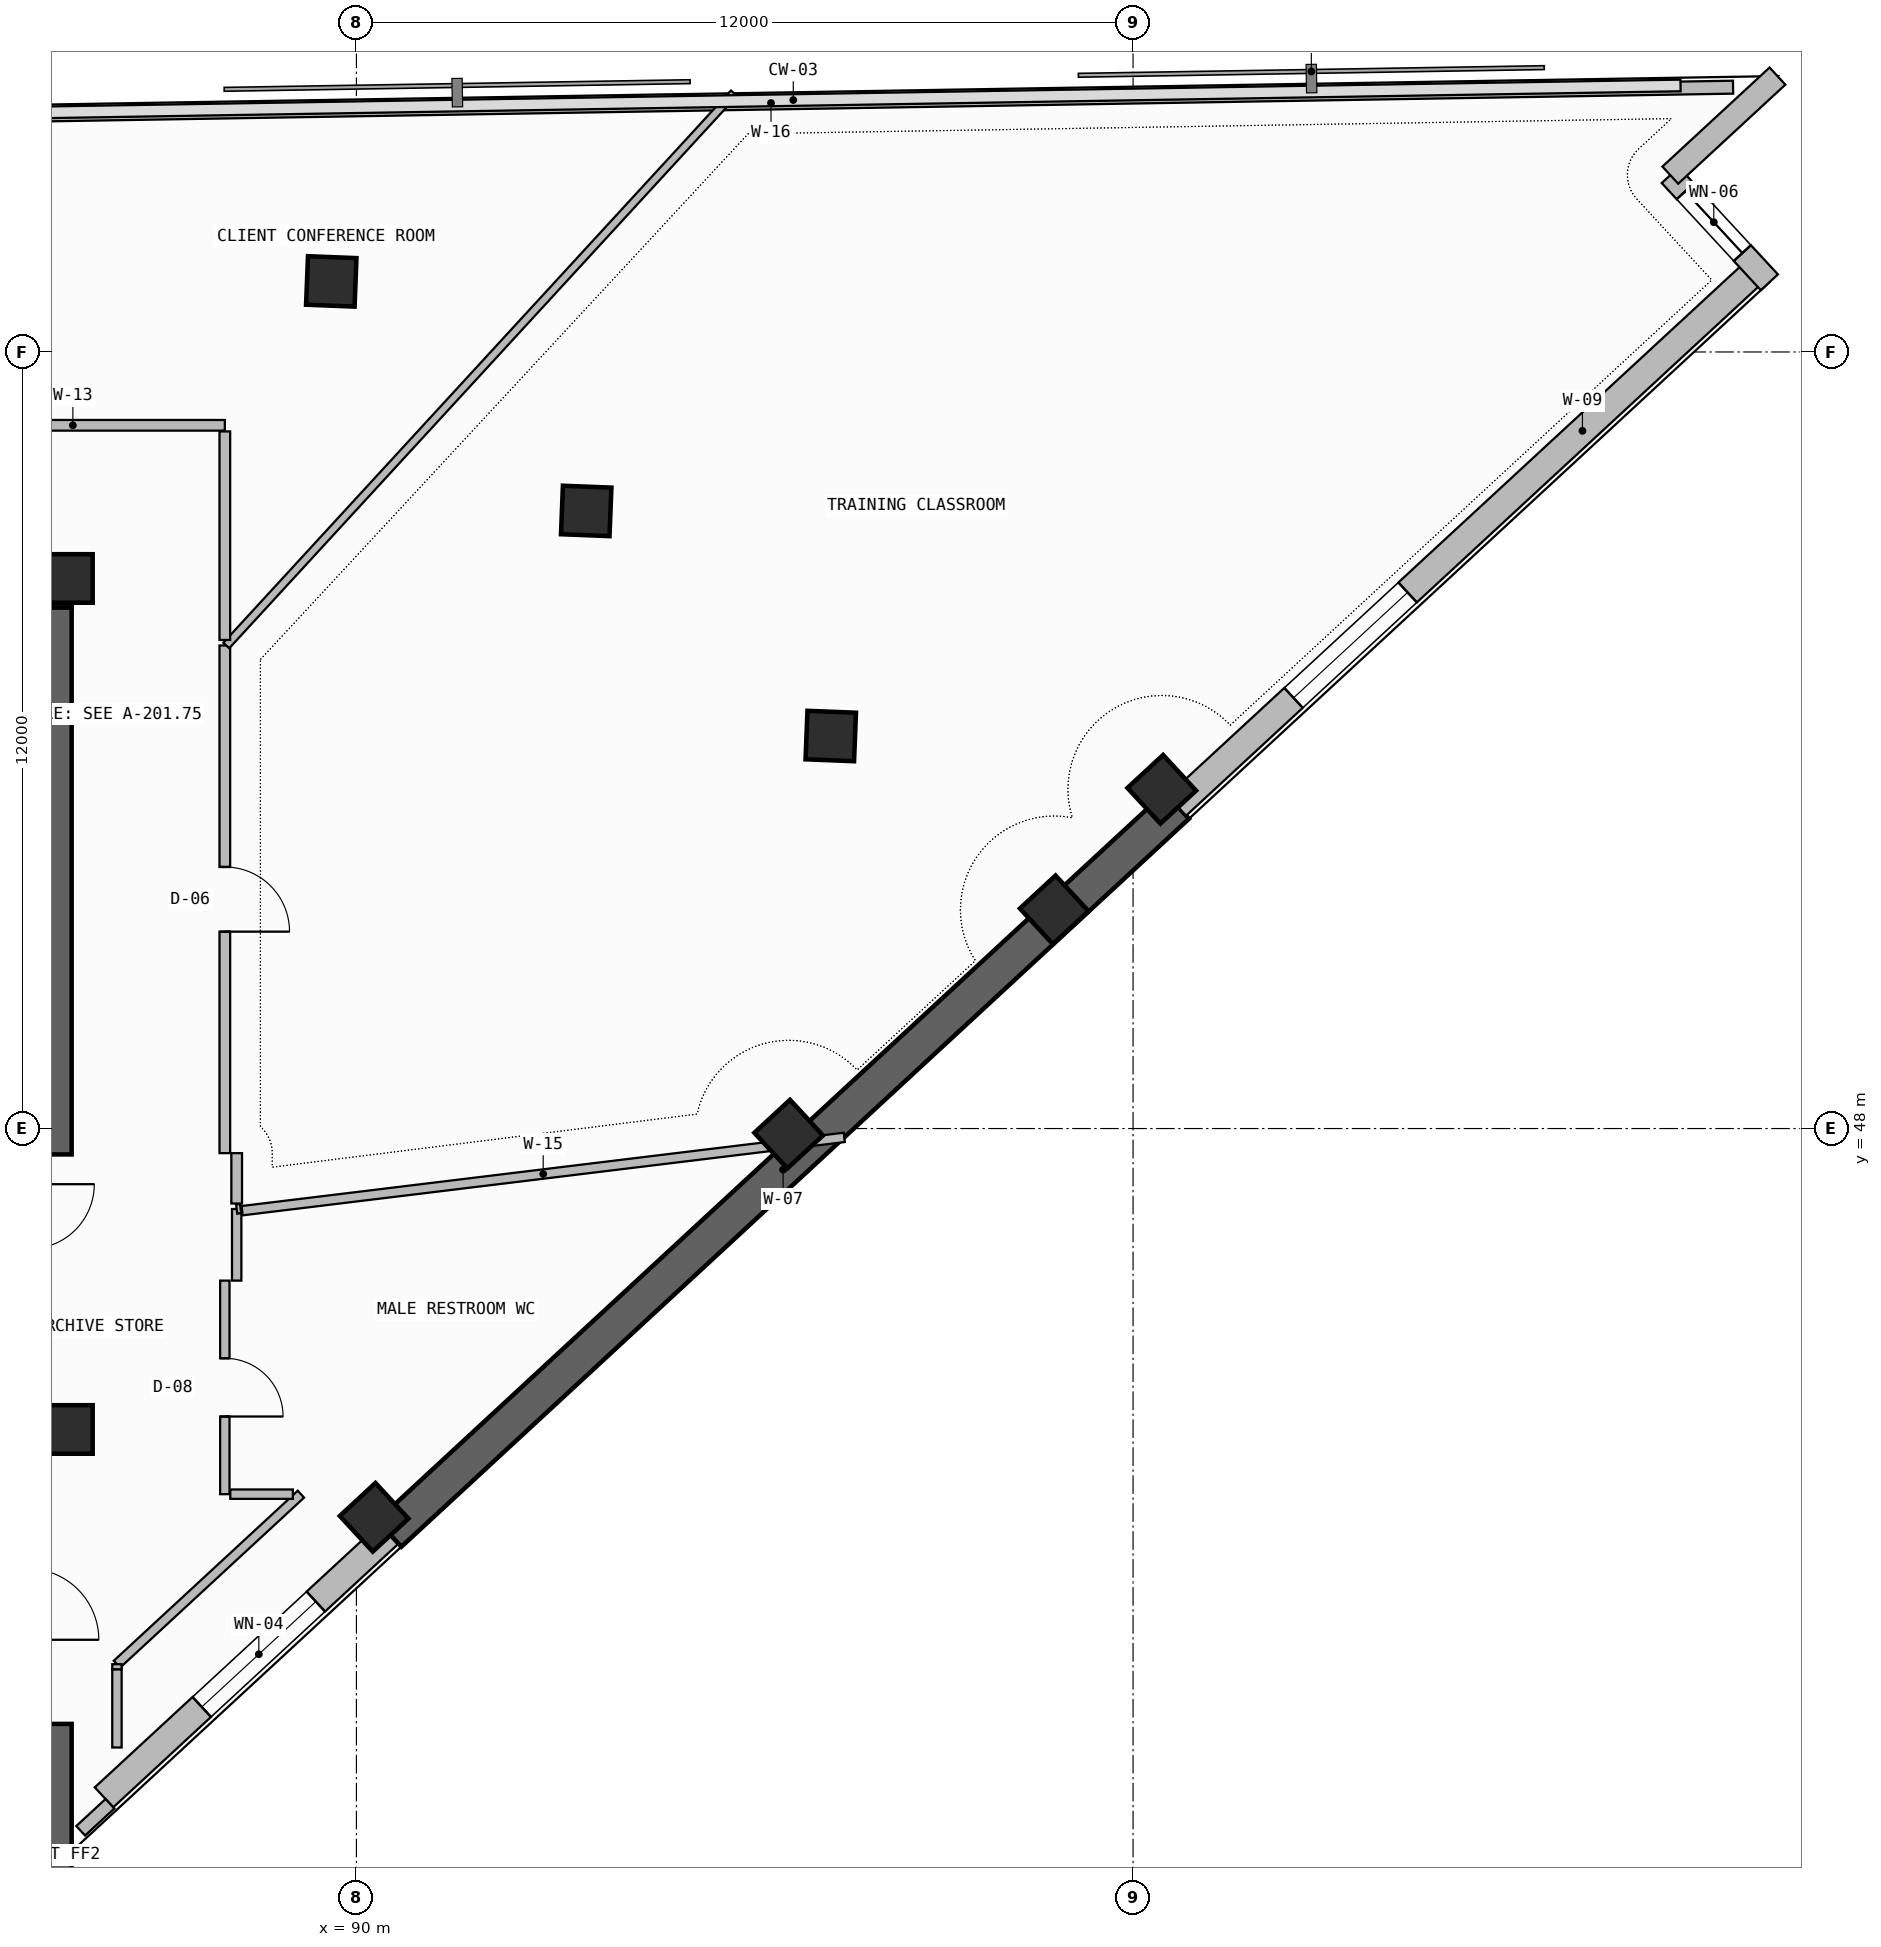
"""IFC4 building model, lengths in metres.
Left out: names, types, materials, properties, quantities, classifications, styles, units other than length and angle.
Written with IfcOpenShell. Run it as: python <this file> out.ifc"""

import sys

from ifc_helpers import new_model, si_unit, direction, frame, frame_2d, origin, origin_2d, place, context, subcontext, project, spatial, rectangle, extrude, element, fill, save


model = new_model("IFC4")
c1 = context("Model", 3, precision=1e-05, world=origin(), true_north=direction((0.0, 1.0)))
c2 = subcontext(c1, "Body", "Model", "MODEL_VIEW")
j1 = project(units=[si_unit("LENGTHUNIT", "METRE"), si_unit("PLANEANGLEUNIT", "RADIAN")], contexts=[c1])
p1 = place(None, origin())
s1 = spatial("IfcSite", under=j1, at=p1, CompositionType="ELEMENT")
p2 = place(p1, origin())
s2 = spatial("IfcBuilding", under=s1, at=p2, CompositionType="ELEMENT")
p3 = place(p2, frame((0.0, 0.0, 267.78)))
s3 = spatial("IfcBuildingStorey", under=s2, at=p3, CompositionType="ELEMENT", Elevation=267.78)
p4 = place(p3, frame((85.3, 35.5, -0.26), z_axis=(0.0, 0.0, 1.0), x_axis=(0.0, 1.0, 0.0)))
e1 = element("IfcWall", 1, at=p4, inside=s3, PredefinedType="SHEAR", context=c2, shape_type="SweptSolid", body=[
    extrude(rectangle(XDim=3.3, YDim=0.6, at=frame_2d((1.65, 0.0))), origin(), (0.0, 0.0, 1.0), 3.52),
])
p5 = place(p3, frame((72.0, 56.35, -0.26), z_axis=(0.0, 0.0, 1.0), x_axis=(1.0, 0.0, 0.0)))
e2 = element("IfcWall", 2, at=p5, inside=s3, PredefinedType="SHEAR", context=c2, shape_type="SweptSolid", body=[
    extrude(rectangle(XDim=13.6, YDim=0.6, at=frame_2d((6.8, 0.0))), origin(), (0.0, 0.0, 1.0), 3.52),
])
p6 = place(p3, frame((85.3, 47.6, -0.26), z_axis=(0.0, 0.0, 1.0), x_axis=(0.0, 1.0, 0.0)))
e3 = element("IfcWall", 3, at=p6, inside=s3, PredefinedType="SHEAR", context=c2, shape_type="SweptSolid", body=[
    extrude(rectangle(XDim=8.45, YDim=0.6, at=frame_2d((4.225, 0.0))), origin(), (0.0, 0.0, 1.0), 3.52),
])
for number, where, z_axis, x_axis in (
    (4, (85.55, 43.35, 0.0), (0.0, 0.0, 1.0), (1.0, 0.0, 0.0)),
    (5, (85.55, 56.5, 0.0), (0.0, 0.0, 1.0), (1.0, 0.0, 0.0)),
    (6, (90.273, 41.993, 0.0), (0.0, 0.0, 1.0), (0.734, 0.679, 0.0)),
    (7, (96.679, 47.914, 0.0), (0.0, 0.0, 1.0), (0.734, 0.679, 0.0)),
    (8, (102.443, 53.242, 0.0), (0.0, 0.0, 1.0), (0.734, 0.679, 0.0)),
    (9, (100.782, 51.38, 0.0), (0.0, 0.0, 1.0), (0.734, 0.679, 0.0)),
    (10, (97.329, 54.065, 0.0), (0.0, 0.0, 1.0), (0.039, 0.999, 0.0)),
    (11, (93.55, 57.544, 0.0), (0.0, 0.0, 1.0), (0.039, 0.999, 0.0)),
    (12, (89.611, 61.09, 0.0), (0.0, 0.0, 1.0), (0.039, 0.999, 0.0)),
):
    element("IfcColumn", number, at=place(p3, frame(where, z_axis=z_axis, x_axis=x_axis)), inside=s3, PredefinedType="COLUMN", context=c2, shape_type="SweptSolid", body=[
        extrude(rectangle(XDim=0.75, YDim=0.75, at=origin_2d()), origin(), (0.0, 0.0, 1.0), 3.52),
    ])
p7 = place(p3, frame((86.1, 37.665, 0.0), z_axis=(0.0, 0.0, 1.0), x_axis=(0.734321413343, 0.678801931277, 0.0)))
e13 = element("IfcWall", 13, at=p7, inside=s3, PredefinedType="SOLIDWALL", context=c2, shape_type="SweptSolid", body=[
    extrude(rectangle(XDim=6.002, YDim=0.42, at=frame_2d((3.001, 0.0))), origin(), (0.0, 0.0, 1.0), 2.245),
])
p8 = place(p7, frame((2.057, 0.0, 0.965)))
e14 = element("IfcOpeningElement", 14, at=p8, cuts=e13, PredefinedType="OPENING", context=c2, shape_type="SweptSolid", body=[
    extrude(rectangle(XDim=2.4, YDim=1.2, at=frame_2d((1.2, 0.6))), frame((0.0, 0.22, 0.0), z_axis=(0.0, -1.0, 0.0), x_axis=(1.0, 0.0, 0.0)), (0.0, 0.0, 1.0), 0.44),
])
p9 = place(p3, frame((90.508, 41.74, -0.26), z_axis=(0.0, 0.0, 1.0), x_axis=(0.734315848115, 0.678807951638, 0.0)))
e15 = element("IfcWall", 15, at=p9, inside=s3, PredefinedType="SHEAR", context=c2, shape_type="SweptSolid", body=[
    extrude(rectangle(XDim=16.573, YDim=0.55, at=frame_2d((8.286, 0.0))), origin(), (0.0, 0.0, 1.0), 3.52),
])
p10 = place(p3, frame((102.677, 52.989, 0.0), z_axis=(0.0, 0.0, 1.0), x_axis=(0.734331107219, 0.678791444386, 0.0)))
e16 = element("IfcWall", 16, at=p10, inside=s3, PredefinedType="SOLIDWALL", context=c2, shape_type="SweptSolid", body=[
    extrude(rectangle(XDim=12.211, YDim=0.42, at=frame_2d((6.106, 0.0))), origin(), (0.0, 0.0, 1.0), 2.245),
])
p11 = place(p10, frame((2.454, 0.0, 0.965)))
e17 = element("IfcOpeningElement", 17, at=p11, cuts=e16, PredefinedType="OPENING", context=c2, shape_type="SweptSolid", body=[
    extrude(rectangle(XDim=2.4, YDim=1.2, at=frame_2d((1.2, 0.6))), frame((0.0, 0.22, 0.0), z_axis=(0.0, -1.0, 0.0), x_axis=(1.0, 0.0, 0.0)), (0.0, 0.0, 1.0), 0.44),
])
p12 = place(p3, frame((111.832, 61.076, 0.0), z_axis=(0.0, 0.0, 1.0), x_axis=(-0.678792531533, 0.734330102294, 0.0)))
e18 = element("IfcWall", 18, at=p12, inside=s3, PredefinedType="SOLIDWALL", context=c2, shape_type="SweptSolid", body=[
    extrude(rectangle(XDim=2.255, YDim=0.36, at=frame_2d((1.127, 0.0))), origin(), (0.0, 0.0, 1.0), 3.26),
])
p13 = place(p12, frame((0.615, 0.0, 0.45)))
e19 = element("IfcOpeningElement", 19, at=p13, cuts=e18, PredefinedType="OPENING", context=c2, shape_type="SweptSolid", body=[
    extrude(rectangle(XDim=1.3, YDim=2.4, at=frame_2d((0.65, 1.2))), frame((0.0, 0.19, 0.0), z_axis=(0.0, -1.0, 0.0), x_axis=(1.0, 0.0, 0.0)), (0.0, 0.0, 1.0), 0.38),
])
p14 = place(p3, frame((110.301, 62.732, 0.0), z_axis=(0.0, 0.0, 1.0), x_axis=(0.734330102294, 0.678792531533, 0.0)))
e20 = element("IfcWall", 20, at=p14, inside=s3, PredefinedType="SOLIDWALL", context=c2, shape_type="SweptSolid", body=[
    extrude(rectangle(XDim=2.255, YDim=0.36, at=frame_2d((1.127, 0.0))), origin(), (0.0, 0.0, 1.0), 3.26),
])
p15 = place(p3, frame((111.271, 64.092, 0.0), z_axis=(0.0, 0.0, 1.0), x_axis=(-0.999864741935, -0.016446818413, 0.0)))
e21 = element("IfcWall", 21, at=p15, inside=s3, PredefinedType="PARAPET", context=c2, shape_type="SweptSolid", body=[
    extrude(rectangle(XDim=29.733, YDim=0.2, at=frame_2d((14.866, 0.0))), origin(), (0.0, 0.0, 1.0), 1.15),
])
p16 = place(p3, frame((86.192, 37.566, 0.0), z_axis=(0.0, 0.0, 1.0), x_axis=(-0.734346728958, -0.678774544064, 0.0)))
e22 = element("IfcWall", 22, at=p16, inside=s3, PredefinedType="PARAPET", context=c2, shape_type="SweptSolid", body=[
    extrude(rectangle(XDim=0.615, YDim=0.2, at=frame_2d((0.308, 0.0))), origin(), (0.0, 0.0, 1.0), 1.15),
])
p17 = place(p3, frame((86.3, 39.722, 0.0), z_axis=(0.0, 0.0, 1.0), x_axis=(0.734312402088, 0.678811679436, 0.0)))
e23 = element("IfcWall", 23, at=p17, inside=s3, PredefinedType="PARTITIONING", context=c2, shape_type="SweptSolid", body=[
    extrude(rectangle(XDim=3.871, YDim=0.145, at=frame_2d((1.936, 0.0))), origin(), (0.0, 0.0, 1.0), 2.745),
])
p18 = place(p3, frame((87.967, 42.35, 0.0), z_axis=(0.0, 0.0, 1.0), x_axis=(0.0, 1.0, 0.0)))
e24 = element("IfcWall", 24, at=p18, inside=s3, PredefinedType="PARTITIONING", context=c2, shape_type="SweptSolid", body=[
    extrude(rectangle(XDim=3.3, YDim=0.145, at=frame_2d((1.65, 0.0))), origin(), (0.0, 0.0, 1.0), 2.745),
])
p19 = place(p18, frame((1.2, 0.0, 0.0)))
e25 = element("IfcOpeningElement", 25, at=p19, cuts=e24, PredefinedType="OPENING", context=c2, shape_type="SweptSolid", body=[
    extrude(rectangle(XDim=0.9, YDim=2.1, at=frame_2d((0.45, 1.05))), frame((0.0, 0.083, 0.0), z_axis=(0.0, -1.0, 0.0), x_axis=(1.0, 0.0, 0.0)), (0.0, 0.0, 1.0), 0.165),
])
p20 = place(p3, frame((89.018, 42.35, 0.0), z_axis=(0.0, 0.0, 1.0), x_axis=(-1.0, 0.0, 0.0)))
e26 = element("IfcWall", 26, at=p20, inside=s3, PredefinedType="PARTITIONING", context=c2, shape_type="SweptSolid", body=[
    extrude(rectangle(XDim=0.967, YDim=0.145, at=frame_2d((0.483, 0.0))), origin(), (0.0, 0.0, 1.0), 2.745),
])
p21 = place(p3, frame((88.15, 45.65, 0.0), z_axis=(0.0, 0.0, 1.0), x_axis=(0.0, 1.0, 0.0)))
e27 = element("IfcWall", 27, at=p21, inside=s3, PredefinedType="PARTITIONING", context=c2, shape_type="SweptSolid", body=[
    extrude(rectangle(XDim=1.106, YDim=0.145, at=frame_2d((0.553, 0.0))), origin(), (0.0, 0.0, 1.0), 3.26),
])
p22 = place(p3, frame((86.3, 39.641, 0.0), z_axis=(0.0, 0.0, 1.0), x_axis=(0.0, 1.0, 0.0)))
e28 = element("IfcWall", 28, at=p22, inside=s3, PredefinedType="PARTITIONING", context=c2, shape_type="SweptSolid", body=[
    extrude(rectangle(XDim=0.082, YDim=0.145, at=frame_2d((0.041, 0.0))), origin(), (0.0, 0.0, 1.0), 3.26),
])
p23 = place(p3, frame((88.15, 46.756, 0.0), z_axis=(0.0, 0.0, 1.0), x_axis=(0.992153283358, 0.125027446277, 0.0)))
e29 = element("IfcWall", 29, at=p23, inside=s3, PredefinedType="PARTITIONING", context=c2, shape_type="SweptSolid", body=[
    extrude(rectangle(XDim=0.061, YDim=0.145, at=frame_2d((0.03, 0.0))), origin(), (0.0, 0.0, 1.0), 3.26),
])
p24 = place(p3, frame((88.235, 46.731, 0.0), z_axis=(0.0, 0.0, 1.0), x_axis=(0.992670746965, 0.120850271491, 0.0)))
e30 = element("IfcWall", 30, at=p24, inside=s3, PredefinedType="PARTITIONING", context=c2, shape_type="SweptSolid", body=[
    extrude(rectangle(XDim=9.372, YDim=0.145, at=frame_2d((4.686, 0.0))), origin(), (0.0, 0.0, 1.0), 2.245),
])
p25 = place(p3, frame((87.967, 47.62, 0.0), z_axis=(0.0, 0.0, 1.0), x_axis=(0.0, 1.0, 0.0)))
e31 = element("IfcWall", 31, at=p25, inside=s3, PredefinedType="PARTITIONING", context=c2, shape_type="SweptSolid", body=[
    extrude(rectangle(XDim=7.844, YDim=0.165, at=frame_2d((3.922, 0.0))), origin(), (0.0, 0.0, 1.0), 3.26),
])
p26 = place(p25, frame((3.422, 0.0, 0.0)))
e32 = element("IfcOpeningElement", 32, at=p26, cuts=e31, PredefinedType="OPENING", context=c2, shape_type="SweptSolid", body=[
    extrude(rectangle(XDim=1.0, YDim=2.2, at=frame_2d((0.5, 1.1))), frame((0.0, 0.093, 0.0), z_axis=(0.0, -1.0, 0.0), x_axis=(1.0, 0.0, 0.0)), (0.0, 0.0, 1.0), 0.185),
])
p27 = place(p3, frame((88.15, 46.841, 0.0), z_axis=(0.0, 0.0, 1.0), x_axis=(0.0, 1.0, 0.0)))
e33 = element("IfcWall", 33, at=p27, inside=s3, PredefinedType="PARTITIONING", context=c2, shape_type="SweptSolid", body=[
    extrude(rectangle(XDim=0.779, YDim=0.165, at=frame_2d((0.389, 0.0))), origin(), (0.0, 0.0, 1.0), 3.26),
])
p28 = place(p3, frame((87.99, 55.464, 0.0), z_axis=(0.0, 0.0, 1.0), x_axis=(0.676751206436, 0.736211793295, 0.0)))
e34 = element("IfcWall", 34, at=p28, inside=s3, PredefinedType="PARTITIONING", context=c2, shape_type="SweptSolid", body=[
    extrude(rectangle(XDim=11.591, YDim=0.125, at=frame_2d((5.795, 0.0))), origin(), (0.0, 0.0, 1.0), 2.645),
])
p29 = place(p3, frame((87.967, 58.867, 0.0), z_axis=(0.0, 0.0, 1.0), x_axis=(-1.0, 0.0, 0.0)))
e35 = element("IfcWall", 35, at=p29, inside=s3, PredefinedType="PARTITIONING", context=c2, shape_type="SweptSolid", body=[
    extrude(rectangle(XDim=8.317, YDim=0.165, at=frame_2d((4.158, 0.0))), origin(), (0.0, 0.0, 1.0), 2.745),
])
p30 = place(p29, frame((4.696, 0.0, 0.0)))
e36 = element("IfcOpeningElement", 36, at=p30, cuts=e35, PredefinedType="OPENING", context=c2, shape_type="SweptSolid", body=[
    extrude(rectangle(XDim=1.0, YDim=2.2, at=frame_2d((0.5, 1.1))), frame((0.0, 0.093, 0.0), z_axis=(0.0, -1.0, 0.0), x_axis=(1.0, 0.0, 0.0)), (0.0, 0.0, 1.0), 0.185),
])
p31 = place(p3, frame((87.967, 55.55, 0.0), z_axis=(0.0, 0.0, 1.0), x_axis=(0.0, 1.0, 0.0)))
e37 = element("IfcWall", 37, at=p31, inside=s3, PredefinedType="PARTITIONING", context=c2, shape_type="SweptSolid", body=[
    extrude(rectangle(XDim=3.222, YDim=0.165, at=frame_2d((1.611, 0.0))), origin(), (0.0, 0.0, 1.0), 2.745),
])
p32 = place(p3, frame((86.3, 38.436, 0.0), z_axis=(0.0, 0.0, 1.0), x_axis=(0.0, 1.0, 0.0)))
e38 = element("IfcWall", 38, at=p32, inside=s3, PredefinedType="PARTITIONING", context=c2, shape_type="SweptSolid", body=[
    extrude(rectangle(XDim=1.205, YDim=0.145, at=frame_2d((0.603, 0.0))), origin(), (0.0, 0.0, 1.0), 3.26),
])
p33 = place(p8, origin())
e39 = element("IfcWindow", 39, at=p33, inside=s3, PartitioningType="SINGLE_PANEL", PredefinedType="WINDOW", context=c2, shape_type="SweptSolid", body=[
    extrude(rectangle(XDim=2.4, YDim=1.2, at=frame_2d((1.2, 0.6))), frame((0.0, 0.03, 0.0), z_axis=(0.0, -1.0, 0.0), x_axis=(1.0, 0.0, 0.0)), (0.0, 0.0, 1.0), 0.06),
])
fill(e14, e39)
p34 = place(p11, origin())
e40 = element("IfcWindow", 40, at=p34, inside=s3, PartitioningType="SINGLE_PANEL", PredefinedType="WINDOW", context=c2, shape_type="SweptSolid", body=[
    extrude(rectangle(XDim=2.4, YDim=1.2, at=frame_2d((1.2, 0.6))), frame((0.0, 0.03, 0.0), z_axis=(0.0, -1.0, 0.0), x_axis=(1.0, 0.0, 0.0)), (0.0, 0.0, 1.0), 0.06),
])
fill(e17, e40)
p35 = place(p13, origin())
e41 = element("IfcWindow", 41, at=p35, inside=s3, PartitioningType="SINGLE_PANEL", PredefinedType="WINDOW", context=c2, shape_type="SweptSolid", body=[
    extrude(rectangle(XDim=1.3, YDim=2.4, at=frame_2d((0.65, 1.2))), frame((0.0, 0.03, 0.0), z_axis=(0.0, -1.0, 0.0), x_axis=(1.0, 0.0, 0.0)), (0.0, 0.0, 1.0), 0.06),
])
fill(e19, e41)
p36 = place(p19, frame((0.9, 0.0, 0.0), z_axis=(0.0, 0.0, 1.0), x_axis=(-1.0, 0.0, 0.0)))
e42 = element("IfcDoor", 42, at=p36, inside=s3, OperationType="SINGLE_SWING_RIGHT", PredefinedType="DOOR", context=c2, shape_type="SweptSolid", body=[
    extrude(rectangle(XDim=0.9, YDim=2.1, at=frame_2d((0.45, 1.05))), frame((0.0, 0.025, 0.0), z_axis=(0.0, -1.0, 0.0), x_axis=(1.0, 0.0, 0.0)), (0.0, 0.0, 1.0), 0.05),
])
fill(e25, e42)
p37 = place(p26, frame((1.0, 0.0, 0.0), z_axis=(0.0, 0.0, 1.0), x_axis=(-1.0, 0.0, 0.0)))
e43 = element("IfcDoor", 43, at=p37, inside=s3, OperationType="SINGLE_SWING_RIGHT", PredefinedType="DOOR", context=c2, shape_type="SweptSolid", body=[
    extrude(rectangle(XDim=1.0, YDim=2.2, at=frame_2d((0.5, 1.1))), frame((0.0, 0.025, 0.0), z_axis=(0.0, -1.0, 0.0), x_axis=(1.0, 0.0, 0.0)), (0.0, 0.0, 1.0), 0.05),
])
fill(e32, e43)
save(model, sys.argv[1])
